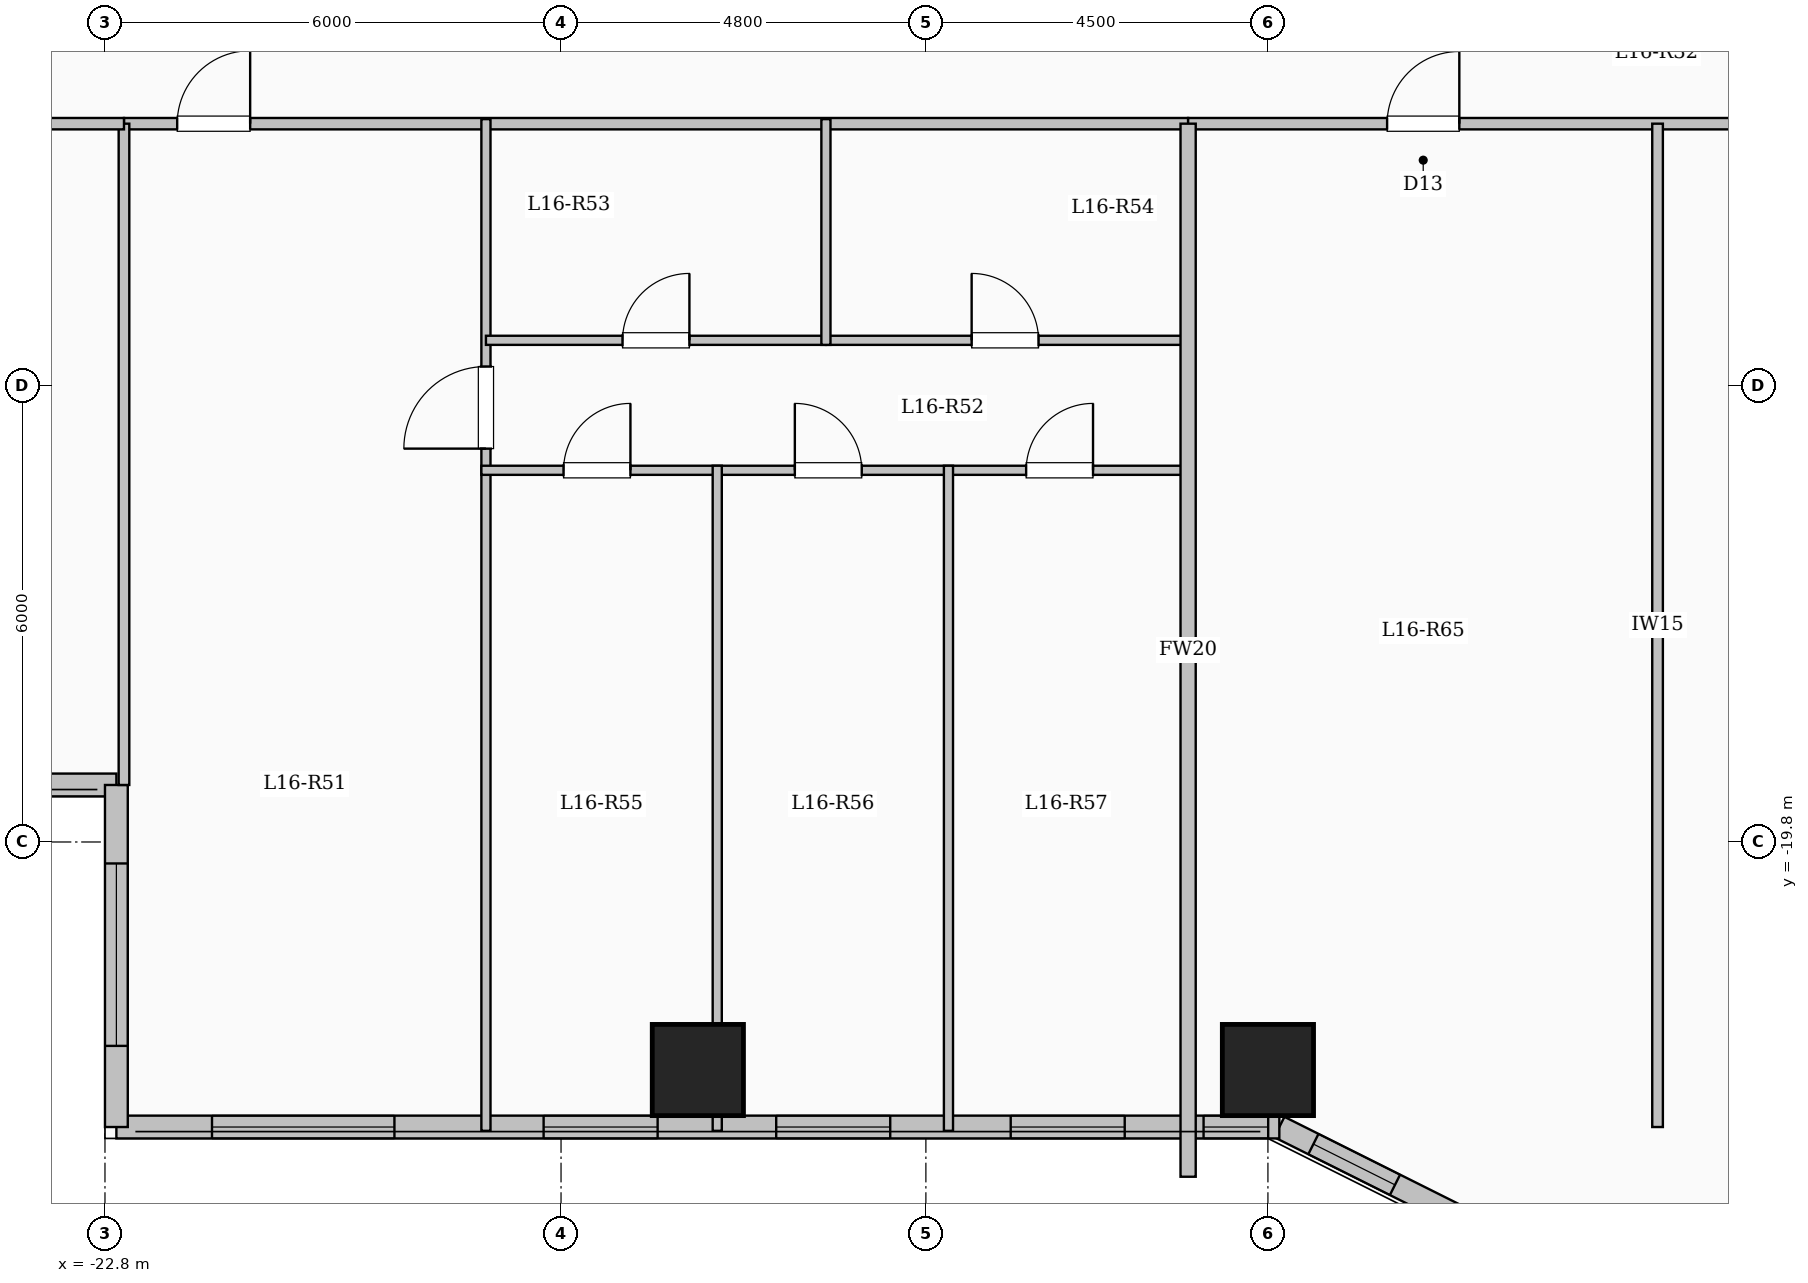
"""IFC4 building model, lengths in metres.
Left out: names, types, materials, properties, quantities, classifications, styles, units other than length and angle.
Written with IfcOpenShell. Run it as: python <this file> out.ifc"""

import sys

from ifc_helpers import new_model, si_unit, direction, frame, frame_2d, origin, origin_2d, place, context, subcontext, project, spatial, rectangle, extrude, element, fill, save


model = new_model("IFC4")
c1 = context("Model", 3, precision=1e-05, world=origin(), true_north=direction((0.0, 1.0)))
c2 = subcontext(c1, "Body", "Model", "MODEL_VIEW")
j1 = project(units=[si_unit("LENGTHUNIT", "METRE"), si_unit("PLANEANGLEUNIT", "RADIAN")], contexts=[c1])
p1 = place(None, origin())
s1 = spatial("IfcSite", under=j1, at=p1, CompositionType="ELEMENT")
p2 = place(p1, origin())
s2 = spatial("IfcBuilding", under=s1, at=p2, CompositionType="ELEMENT")
p3 = place(p2, frame((0.0, 0.0, 60.85)))
s3 = spatial("IfcBuildingStorey", under=s2, at=p3, CompositionType="ELEMENT", Elevation=60.85)
for number, where, z_axis, x_axis in (
    (1, (-15.0, -22.8, 0.0), (0.0, 0.0, 1.0), (1.0, 0.0, 0.0)),
    (2, (-7.5, -22.8, 0.0), (0.0, 0.0, 1.0), (1.0, 0.0, 0.0)),
):
    element("IfcColumn", number, at=place(p3, frame(where, z_axis=z_axis, x_axis=x_axis)), inside=s3, PredefinedType="COLUMN", context=c2, shape_type="SweptSolid", body=[
        extrude(rectangle(XDim=1.2, YDim=1.2, at=origin_2d()), origin(), (0.0, 0.0, 1.0), 3.35),
    ])
p4 = place(p3, frame((-22.65, -19.05, 0.0), z_axis=(0.0, 0.0, 1.0), x_axis=(-1.0, 0.0, 0.0)))
e3 = element("IfcWall", 3, at=p4, inside=s3, PredefinedType="SOLIDWALL", context=c2, shape_type="SweptSolid", body=[
    extrude(rectangle(XDim=6.0, YDim=0.3, at=frame_2d((3.0, 0.0))), origin(), (0.0, 0.0, 1.0), 3.05),
])
p5 = place(p4, frame((1.775, 0.0, 0.9)))
e4 = element("IfcOpeningElement", 4, at=p5, cuts=e3, PredefinedType="OPENING", context=c2, shape_type="SweptSolid", body=[
    extrude(rectangle(XDim=2.4, YDim=1.8, at=frame_2d((1.2, 0.9))), frame((0.0, 0.16, 0.0), z_axis=(0.0, -1.0, 0.0), x_axis=(1.0, 0.0, 0.0)), (0.0, 0.0, 1.0), 0.32),
])
p6 = place(p3, frame((-4.35, -25.05, 0.0), z_axis=(0.0, 0.0, 1.0), x_axis=(-0.894427191, 0.4472135955, 0.0)))
e5 = element("IfcWall", 5, at=p6, inside=s3, PredefinedType="SOLIDWALL", context=c2, shape_type="SweptSolid", body=[
    extrude(rectangle(XDim=3.354, YDim=0.3, at=frame_2d((1.677, 0.0))), origin(), (0.0, 0.0, 1.0), 3.05),
])
p7 = place(p6, frame((1.653, 0.0, 0.95)))
e6 = element("IfcOpeningElement", 6, at=p7, cuts=e5, PredefinedType="OPENING", context=c2, shape_type="SweptSolid", body=[
    extrude(rectangle(XDim=1.2, YDim=1.5, at=frame_2d((0.6, 0.75))), frame((0.0, 0.16, 0.0), z_axis=(0.0, -1.0, 0.0), x_axis=(1.0, 0.0, 0.0)), (0.0, 0.0, 1.0), 0.32),
])
p8 = place(p3, frame((-7.35, -23.55, 0.0), z_axis=(0.0, 0.0, 1.0), x_axis=(-1.0, 0.0, 0.0)))
e7 = element("IfcWall", 7, at=p8, inside=s3, PredefinedType="SOLIDWALL", context=c2, shape_type="SweptSolid", body=[
    extrude(rectangle(XDim=15.3, YDim=0.3, at=frame_2d((7.65, 0.0))), origin(), (0.0, 0.0, 1.0), 3.05),
])
p9 = place(p8, frame((0.147, 0.0, 0.95)))
e8 = element("IfcOpeningElement", 8, at=p9, cuts=e7, PredefinedType="OPENING", context=c2, shape_type="SweptSolid", body=[
    extrude(rectangle(XDim=0.85, YDim=1.5, at=frame_2d((0.425, 0.75))), frame((0.0, 0.16, 0.0), z_axis=(0.0, -1.0, 0.0), x_axis=(1.0, 0.0, 0.0)), (0.0, 0.0, 1.0), 0.32),
])
p10 = place(p8, frame((2.034, 0.0, 0.9)))
e9 = element("IfcOpeningElement", 9, at=p10, cuts=e7, PredefinedType="OPENING", context=c2, shape_type="SweptSolid", body=[
    extrude(rectangle(XDim=1.5, YDim=1.65, at=frame_2d((0.75, 0.825))), frame((0.0, 0.16, 0.0), z_axis=(0.0, -1.0, 0.0), x_axis=(1.0, 0.0, 0.0)), (0.0, 0.0, 1.0), 0.32),
])
p11 = place(p8, frame((5.119, 0.0, 0.9)))
e10 = element("IfcOpeningElement", 10, at=p11, cuts=e7, PredefinedType="OPENING", context=c2, shape_type="SweptSolid", body=[
    extrude(rectangle(XDim=1.5, YDim=1.65, at=frame_2d((0.75, 0.825))), frame((0.0, 0.16, 0.0), z_axis=(0.0, -1.0, 0.0), x_axis=(1.0, 0.0, 0.0)), (0.0, 0.0, 1.0), 0.32),
])
p12 = place(p8, frame((8.179, 0.0, 0.9)))
e11 = element("IfcOpeningElement", 11, at=p12, cuts=e7, PredefinedType="OPENING", context=c2, shape_type="SweptSolid", body=[
    extrude(rectangle(XDim=1.5, YDim=1.65, at=frame_2d((0.75, 0.825))), frame((0.0, 0.16, 0.0), z_axis=(0.0, -1.0, 0.0), x_axis=(1.0, 0.0, 0.0)), (0.0, 0.0, 1.0), 0.32),
])
p13 = place(p8, frame((11.642, 0.0, 0.9)))
e12 = element("IfcOpeningElement", 12, at=p13, cuts=e7, PredefinedType="OPENING", context=c2, shape_type="SweptSolid", body=[
    extrude(rectangle(XDim=2.4, YDim=1.8, at=frame_2d((1.2, 0.9))), frame((0.0, 0.16, 0.0), z_axis=(0.0, -1.0, 0.0), x_axis=(1.0, 0.0, 0.0)), (0.0, 0.0, 1.0), 0.32),
])
p14 = place(p3, frame((-22.65, -23.55, 0.0), z_axis=(0.0, 0.0, 1.0), x_axis=(0.0, 1.0, 0.0)))
e13 = element("IfcWall", 13, at=p14, inside=s3, PredefinedType="SOLIDWALL", context=c2, shape_type="SweptSolid", body=[
    extrude(rectangle(XDim=4.5, YDim=0.3, at=frame_2d((2.25, 0.0))), origin(), (0.0, 0.0, 1.0), 3.05),
])
p15 = place(p14, frame((1.067, 0.0, 0.9)))
e14 = element("IfcOpeningElement", 14, at=p15, cuts=e13, PredefinedType="OPENING", context=c2, shape_type="SweptSolid", body=[
    extrude(rectangle(XDim=2.4, YDim=1.8, at=frame_2d((1.2, 0.9))), frame((0.0, 0.16, 0.0), z_axis=(0.0, -1.0, 0.0), x_axis=(1.0, 0.0, 0.0)), (0.0, 0.0, 1.0), 0.32),
])
p16 = place(p3, frame((-22.55, -10.35, 0.0), z_axis=(0.0, 0.0, 1.0), x_axis=(1.0, 0.0, 0.0)))
e15 = element("IfcWall", 15, at=p16, inside=s3, PredefinedType="PARTITIONING", context=c2, shape_type="SweptSolid", body=[
    extrude(rectangle(XDim=14.0, YDim=0.15, at=frame_2d((7.0, 0.0))), origin(), (0.0, 0.0, 1.0), 3.05),
])
p17 = place(p16, frame((0.7, 0.0, 0.0)))
e16 = element("IfcOpeningElement", 16, at=p17, cuts=e15, PredefinedType="OPENING", context=c2, shape_type="SweptSolid", body=[
    extrude(rectangle(XDim=0.96, YDim=2.15, at=frame_2d((0.48, 1.075))), frame((0.0, 0.085, 0.0), z_axis=(0.0, -1.0, 0.0), x_axis=(1.0, 0.0, 0.0)), (0.0, 0.0, 1.0), 0.17),
])
p18 = place(p3, frame((-8.55, -10.35, 0.0), z_axis=(0.0, 0.0, 1.0), x_axis=(1.0, 0.0, 0.0)))
e17 = element("IfcWall", 17, at=p18, inside=s3, PredefinedType="PARTITIONING", context=c2, shape_type="SweptSolid", body=[
    extrude(rectangle(XDim=17.1, YDim=0.15, at=frame_2d((8.55, 0.0))), origin(), (0.0, 0.0, 1.0), 3.05),
])
p19 = place(p18, frame((2.618, 0.0, 0.0)))
e18 = element("IfcOpeningElement", 18, at=p19, cuts=e17, PredefinedType="OPENING", context=c2, shape_type="SweptSolid", body=[
    extrude(rectangle(XDim=0.95, YDim=2.15, at=frame_2d((0.475, 1.075))), frame((0.0, 0.085, 0.0), z_axis=(0.0, -1.0, 0.0), x_axis=(1.0, 0.0, 0.0)), (0.0, 0.0, 1.0), 0.17),
])
p20 = place(p18, frame((8.754, 0.0, 0.0)))
e19 = element("IfcOpeningElement", 19, at=p20, cuts=e17, PredefinedType="OPENING", context=c2, shape_type="SweptSolid", body=[
    extrude(rectangle(XDim=0.95, YDim=2.15, at=frame_2d((0.475, 1.075))), frame((0.0, 0.085, 0.0), z_axis=(0.0, -1.0, 0.0), x_axis=(1.0, 0.0, 0.0)), (0.0, 0.0, 1.0), 0.17),
])
p21 = place(p18, frame((14.211, 0.0, 0.0)))
e20 = element("IfcOpeningElement", 20, at=p21, cuts=e17, PredefinedType="OPENING", context=c2, shape_type="SweptSolid", body=[
    extrude(rectangle(XDim=0.95, YDim=2.15, at=frame_2d((0.475, 1.075))), frame((0.0, 0.085, 0.0), z_axis=(0.0, -1.0, 0.0), x_axis=(1.0, 0.0, 0.0)), (0.0, 0.0, 1.0), 0.17),
])
p22 = place(p3, frame((-17.788, -23.6, 0.0), z_axis=(0.0, 0.0, 1.0), x_axis=(0.0, 1.0, 0.0)))
e21 = element("IfcWall", 21, at=p22, inside=s3, PredefinedType="PARTITIONING", context=c2, shape_type="SweptSolid", body=[
    extrude(rectangle(XDim=13.31, YDim=0.12, at=frame_2d((6.655, 0.0))), origin(), (0.0, 0.0, 1.0), 3.05),
])
p23 = place(p22, frame((8.975, 0.0, 0.0)))
e22 = element("IfcOpeningElement", 22, at=p23, cuts=e21, PredefinedType="OPENING", context=c2, shape_type="SweptSolid", body=[
    extrude(rectangle(XDim=1.08, YDim=2.15, at=frame_2d((0.54, 1.075))), frame((0.0, 0.07, 0.0), z_axis=(0.0, -1.0, 0.0), x_axis=(1.0, 0.0, 0.0)), (0.0, 0.0, 1.0), 0.14),
])
p24 = place(p3, frame((-17.788, -13.2, 0.0), z_axis=(0.0, 0.0, 1.0), x_axis=(1.0, 0.0, 0.0)))
e23 = element("IfcWall", 23, at=p24, inside=s3, PredefinedType="PARTITIONING", context=c2, shape_type="SweptSolid", body=[
    extrude(rectangle(XDim=4.473, YDim=0.12, at=frame_2d((2.237, 0.0))), origin(), (0.0, 0.0, 1.0), 3.05),
])
p25 = place(p24, frame((1.797, 0.0, 0.0)))
e24 = element("IfcOpeningElement", 24, at=p25, cuts=e23, PredefinedType="OPENING", context=c2, shape_type="SweptSolid", body=[
    extrude(rectangle(XDim=0.88, YDim=2.1, at=frame_2d((0.44, 1.05))), frame((0.0, 0.07, 0.0), z_axis=(0.0, -1.0, 0.0), x_axis=(1.0, 0.0, 0.0)), (0.0, 0.0, 1.0), 0.14),
])
p26 = place(p3, frame((-13.315, -13.2, 0.0), z_axis=(0.0, 0.0, 1.0), x_axis=(1.0, 0.0, 0.0)))
e25 = element("IfcWall", 25, at=p26, inside=s3, PredefinedType="PARTITIONING", context=c2, shape_type="SweptSolid", body=[
    extrude(rectangle(XDim=4.715, YDim=0.12, at=frame_2d((2.357, 0.0))), origin(), (0.0, 0.0, 1.0), 3.05),
])
p27 = place(p26, frame((1.917, 0.0, 0.0)))
e26 = element("IfcOpeningElement", 26, at=p27, cuts=e25, PredefinedType="OPENING", context=c2, shape_type="SweptSolid", body=[
    extrude(rectangle(XDim=0.88, YDim=2.1, at=frame_2d((0.44, 1.05))), frame((0.0, 0.07, 0.0), z_axis=(0.0, -1.0, 0.0), x_axis=(1.0, 0.0, 0.0)), (0.0, 0.0, 1.0), 0.14),
])
p28 = place(p3, frame((-17.848, -14.91, 0.0), z_axis=(0.0, 0.0, 1.0), x_axis=(1.0, 0.0, 0.0)))
e27 = element("IfcWall", 27, at=p28, inside=s3, PredefinedType="PARTITIONING", context=c2, shape_type="SweptSolid", body=[
    extrude(rectangle(XDim=9.308, YDim=0.12, at=frame_2d((4.654, 0.0))), origin(), (0.0, 0.0, 1.0), 2.535),
])
p29 = place(p28, frame((1.081, 0.0, 0.0)))
e28 = element("IfcOpeningElement", 28, at=p29, cuts=e27, PredefinedType="OPENING", context=c2, shape_type="SweptSolid", body=[
    extrude(rectangle(XDim=0.88, YDim=2.1, at=frame_2d((0.44, 1.05))), frame((0.0, 0.07, 0.0), z_axis=(0.0, -1.0, 0.0), x_axis=(1.0, 0.0, 0.0)), (0.0, 0.0, 1.0), 0.14),
])
p30 = place(p28, frame((4.124, 0.0, 0.0)))
e29 = element("IfcOpeningElement", 29, at=p30, cuts=e27, PredefinedType="OPENING", context=c2, shape_type="SweptSolid", body=[
    extrude(rectangle(XDim=0.88, YDim=2.1, at=frame_2d((0.44, 1.05))), frame((0.0, 0.07, 0.0), z_axis=(0.0, -1.0, 0.0), x_axis=(1.0, 0.0, 0.0)), (0.0, 0.0, 1.0), 0.14),
])
p31 = place(p28, frame((7.167, 0.0, 0.0)))
e30 = element("IfcOpeningElement", 30, at=p31, cuts=e27, PredefinedType="OPENING", context=c2, shape_type="SweptSolid", body=[
    extrude(rectangle(XDim=0.88, YDim=2.1, at=frame_2d((0.44, 1.05))), frame((0.0, 0.07, 0.0), z_axis=(0.0, -1.0, 0.0), x_axis=(1.0, 0.0, 0.0)), (0.0, 0.0, 1.0), 0.14),
])
p32 = place(p3, frame((-13.315, -13.26, 0.0), z_axis=(0.0, 0.0, 1.0), x_axis=(0.0, 1.0, 0.0)))
e31 = element("IfcWall", 31, at=p32, inside=s3, PredefinedType="PARTITIONING", context=c2, shape_type="SweptSolid", body=[
    extrude(rectangle(XDim=2.97, YDim=0.12, at=frame_2d((1.485, 0.0))), origin(), (0.0, 0.0, 1.0), 3.05),
])
p33 = place(p3, frame((-14.745, -23.6, 0.0), z_axis=(0.0, 0.0, 1.0), x_axis=(0.0, 1.0, 0.0)))
e32 = element("IfcWall", 32, at=p33, inside=s3, PredefinedType="PARTITIONING", context=c2, shape_type="SweptSolid", body=[
    extrude(rectangle(XDim=8.75, YDim=0.12, at=frame_2d((4.375, 0.0))), origin(), (0.0, 0.0, 1.0), 2.385),
])
p34 = place(p3, frame((-11.703, -23.6, 0.0), z_axis=(0.0, 0.0, 1.0), x_axis=(0.0, 1.0, 0.0)))
e33 = element("IfcWall", 33, at=p34, inside=s3, PredefinedType="PARTITIONING", context=c2, shape_type="SweptSolid", body=[
    extrude(rectangle(XDim=8.75, YDim=0.12, at=frame_2d((4.375, 0.0))), origin(), (0.0, 0.0, 1.0), 3.05),
])
p35 = place(p3, frame((-8.55, -24.204, 0.0), z_axis=(0.0, 0.0, 1.0), x_axis=(0.0, 1.0, 0.0)))
e34 = element("IfcWall", 34, at=p35, inside=s3, PredefinedType="SOLIDWALL", context=c2, shape_type="SweptSolid", body=[
    extrude(rectangle(XDim=13.854, YDim=0.2, at=frame_2d((6.927, 0.0))), origin(), (0.0, 0.0, 1.0), 3.05),
])
p36 = place(p3, frame((-2.374, -23.55, 0.0), z_axis=(0.0, 0.0, 1.0), x_axis=(0.0, 1.0, 0.0)))
e35 = element("IfcWall", 35, at=p36, inside=s3, PredefinedType="PARTITIONING", context=c2, shape_type="SweptSolid", body=[
    extrude(rectangle(XDim=13.2, YDim=0.14, at=frame_2d((6.6, 0.0))), origin(), (0.0, 0.0, 1.0), 3.05),
])
p37 = place(p3, frame((-22.55, -19.05, 0.0), z_axis=(0.0, 0.0, 1.0), x_axis=(0.0, 1.0, 0.0)))
e36 = element("IfcWall", 36, at=p37, inside=s3, PredefinedType="PARTITIONING", context=c2, shape_type="SweptSolid", body=[
    extrude(rectangle(XDim=8.7, YDim=0.14, at=frame_2d((4.35, 0.0))), origin(), (0.0, 0.0, 1.0), 3.05),
])
p38 = place(p3, frame((-28.68, -10.35, 0.0), z_axis=(0.0, 0.0, 1.0), x_axis=(1.0, 0.0, 0.0)))
e37 = element("IfcWall", 37, at=p38, inside=s3, PredefinedType="PARTITIONING", context=c2, shape_type="SweptSolid", body=[
    extrude(rectangle(XDim=6.13, YDim=0.15, at=frame_2d((3.065, 0.0))), origin(), (0.0, 0.0, 1.0), 3.05),
])
p39 = place(p38, frame((2.59, 0.0, 0.0)))
e38 = element("IfcOpeningElement", 38, at=p39, cuts=e37, PredefinedType="OPENING", context=c2, shape_type="SweptSolid", body=[
    extrude(rectangle(XDim=0.95, YDim=2.15, at=frame_2d((0.475, 1.075))), frame((0.0, 0.085, 0.0), z_axis=(0.0, -1.0, 0.0), x_axis=(1.0, 0.0, 0.0)), (0.0, 0.0, 1.0), 0.17),
])
p40 = place(p7, origin())
e39 = element("IfcWindow", 39, at=p40, inside=s3, PartitioningType="SINGLE_PANEL", PredefinedType="WINDOW", context=c2, shape_type="SweptSolid", body=[
    extrude(rectangle(XDim=1.2, YDim=1.5, at=frame_2d((0.6, 0.75))), frame((0.0, 0.03, 0.0), z_axis=(0.0, -1.0, 0.0), x_axis=(1.0, 0.0, 0.0)), (0.0, 0.0, 1.0), 0.06),
])
fill(e6, e39)
p41 = place(p9, origin())
e40 = element("IfcWindow", 40, at=p41, inside=s3, PartitioningType="SINGLE_PANEL", PredefinedType="WINDOW", context=c2, shape_type="SweptSolid", body=[
    extrude(rectangle(XDim=0.85, YDim=1.5, at=frame_2d((0.425, 0.75))), frame((0.0, 0.03, 0.0), z_axis=(0.0, -1.0, 0.0), x_axis=(1.0, 0.0, 0.0)), (0.0, 0.0, 1.0), 0.06),
])
fill(e8, e40)
p42 = place(p10, origin())
e41 = element("IfcWindow", 41, at=p42, inside=s3, PartitioningType="SINGLE_PANEL", PredefinedType="WINDOW", context=c2, shape_type="SweptSolid", body=[
    extrude(rectangle(XDim=1.5, YDim=1.65, at=frame_2d((0.75, 0.825))), frame((0.0, 0.03, 0.0), z_axis=(0.0, -1.0, 0.0), x_axis=(1.0, 0.0, 0.0)), (0.0, 0.0, 1.0), 0.06),
])
fill(e9, e41)
p43 = place(p11, origin())
e42 = element("IfcWindow", 42, at=p43, inside=s3, PartitioningType="SINGLE_PANEL", PredefinedType="WINDOW", context=c2, shape_type="SweptSolid", body=[
    extrude(rectangle(XDim=1.5, YDim=1.65, at=frame_2d((0.75, 0.825))), frame((0.0, 0.03, 0.0), z_axis=(0.0, -1.0, 0.0), x_axis=(1.0, 0.0, 0.0)), (0.0, 0.0, 1.0), 0.06),
])
fill(e10, e42)
p44 = place(p12, origin())
e43 = element("IfcWindow", 43, at=p44, inside=s3, PartitioningType="SINGLE_PANEL", PredefinedType="WINDOW", context=c2, shape_type="SweptSolid", body=[
    extrude(rectangle(XDim=1.5, YDim=1.65, at=frame_2d((0.75, 0.825))), frame((0.0, 0.03, 0.0), z_axis=(0.0, -1.0, 0.0), x_axis=(1.0, 0.0, 0.0)), (0.0, 0.0, 1.0), 0.06),
])
fill(e11, e43)
p45 = place(p13, origin())
e44 = element("IfcWindow", 44, at=p45, inside=s3, PartitioningType="SINGLE_PANEL", PredefinedType="WINDOW", context=c2, shape_type="SweptSolid", body=[
    extrude(rectangle(XDim=2.4, YDim=1.8, at=frame_2d((1.2, 0.9))), frame((0.0, 0.03, 0.0), z_axis=(0.0, -1.0, 0.0), x_axis=(1.0, 0.0, 0.0)), (0.0, 0.0, 1.0), 0.06),
])
fill(e12, e44)
p46 = place(p15, origin())
e45 = element("IfcWindow", 45, at=p46, inside=s3, PartitioningType="SINGLE_PANEL", PredefinedType="WINDOW", context=c2, shape_type="SweptSolid", body=[
    extrude(rectangle(XDim=2.4, YDim=1.8, at=frame_2d((1.2, 0.9))), frame((0.0, 0.03, 0.0), z_axis=(0.0, -1.0, 0.0), x_axis=(1.0, 0.0, 0.0)), (0.0, 0.0, 1.0), 0.06),
])
fill(e14, e45)
p47 = place(p17, origin())
e46 = element("IfcDoor", 46, at=p47, inside=s3, OperationType="SINGLE_SWING_RIGHT", PredefinedType="DOOR", context=c2, shape_type="SweptSolid", body=[
    extrude(rectangle(XDim=0.96, YDim=2.15, at=frame_2d((0.48, 1.075))), frame((0.0, 0.025, 0.0), z_axis=(0.0, -1.0, 0.0), x_axis=(1.0, 0.0, 0.0)), (0.0, 0.0, 1.0), 0.05),
])
fill(e16, e46)
p48 = place(p23, origin())
e47 = element("IfcDoor", 47, at=p48, inside=s3, OperationType="SINGLE_SWING_LEFT", PredefinedType="DOOR", context=c2, shape_type="SweptSolid", body=[
    extrude(rectangle(XDim=1.08, YDim=2.15, at=frame_2d((0.54, 1.075))), frame((0.0, 0.025, 0.0), z_axis=(0.0, -1.0, 0.0), x_axis=(1.0, 0.0, 0.0)), (0.0, 0.0, 1.0), 0.05),
])
fill(e22, e47)
p49 = place(p25, origin())
e48 = element("IfcDoor", 48, at=p49, inside=s3, OperationType="SINGLE_SWING_RIGHT", PredefinedType="DOOR", context=c2, shape_type="SweptSolid", body=[
    extrude(rectangle(XDim=0.88, YDim=2.1, at=frame_2d((0.44, 1.05))), frame((0.0, 0.025, 0.0), z_axis=(0.0, -1.0, 0.0), x_axis=(1.0, 0.0, 0.0)), (0.0, 0.0, 1.0), 0.05),
])
fill(e24, e48)
p50 = place(p27, origin())
e49 = element("IfcDoor", 49, at=p50, inside=s3, OperationType="SINGLE_SWING_LEFT", PredefinedType="DOOR", context=c2, shape_type="SweptSolid", body=[
    extrude(rectangle(XDim=0.88, YDim=2.1, at=frame_2d((0.44, 1.05))), frame((0.0, 0.025, 0.0), z_axis=(0.0, -1.0, 0.0), x_axis=(1.0, 0.0, 0.0)), (0.0, 0.0, 1.0), 0.05),
])
fill(e26, e49)
p51 = place(p29, origin())
e50 = element("IfcDoor", 50, at=p51, inside=s3, OperationType="SINGLE_SWING_RIGHT", PredefinedType="DOOR", context=c2, shape_type="SweptSolid", body=[
    extrude(rectangle(XDim=0.88, YDim=2.1, at=frame_2d((0.44, 1.05))), frame((0.0, 0.025, 0.0), z_axis=(0.0, -1.0, 0.0), x_axis=(1.0, 0.0, 0.0)), (0.0, 0.0, 1.0), 0.05),
])
fill(e28, e50)
p52 = place(p30, origin())
e51 = element("IfcDoor", 51, at=p52, inside=s3, OperationType="SINGLE_SWING_LEFT", PredefinedType="DOOR", context=c2, shape_type="SweptSolid", body=[
    extrude(rectangle(XDim=0.88, YDim=2.1, at=frame_2d((0.44, 1.05))), frame((0.0, 0.025, 0.0), z_axis=(0.0, -1.0, 0.0), x_axis=(1.0, 0.0, 0.0)), (0.0, 0.0, 1.0), 0.05),
])
fill(e29, e51)
p53 = place(p31, origin())
e52 = element("IfcDoor", 52, at=p53, inside=s3, OperationType="SINGLE_SWING_RIGHT", PredefinedType="DOOR", context=c2, shape_type="SweptSolid", body=[
    extrude(rectangle(XDim=0.88, YDim=2.1, at=frame_2d((0.44, 1.05))), frame((0.0, 0.025, 0.0), z_axis=(0.0, -1.0, 0.0), x_axis=(1.0, 0.0, 0.0)), (0.0, 0.0, 1.0), 0.05),
])
fill(e30, e52)
p54 = place(p19, origin())
e53 = element("IfcDoor", 53, at=p54, inside=s3, OperationType="SINGLE_SWING_RIGHT", PredefinedType="DOOR", context=c2, shape_type="SweptSolid", body=[
    extrude(rectangle(XDim=0.95, YDim=2.15, at=frame_2d((0.475, 1.075))), frame((0.0, 0.025, 0.0), z_axis=(0.0, -1.0, 0.0), x_axis=(1.0, 0.0, 0.0)), (0.0, 0.0, 1.0), 0.05),
])
fill(e18, e53)
save(model, sys.argv[1])
